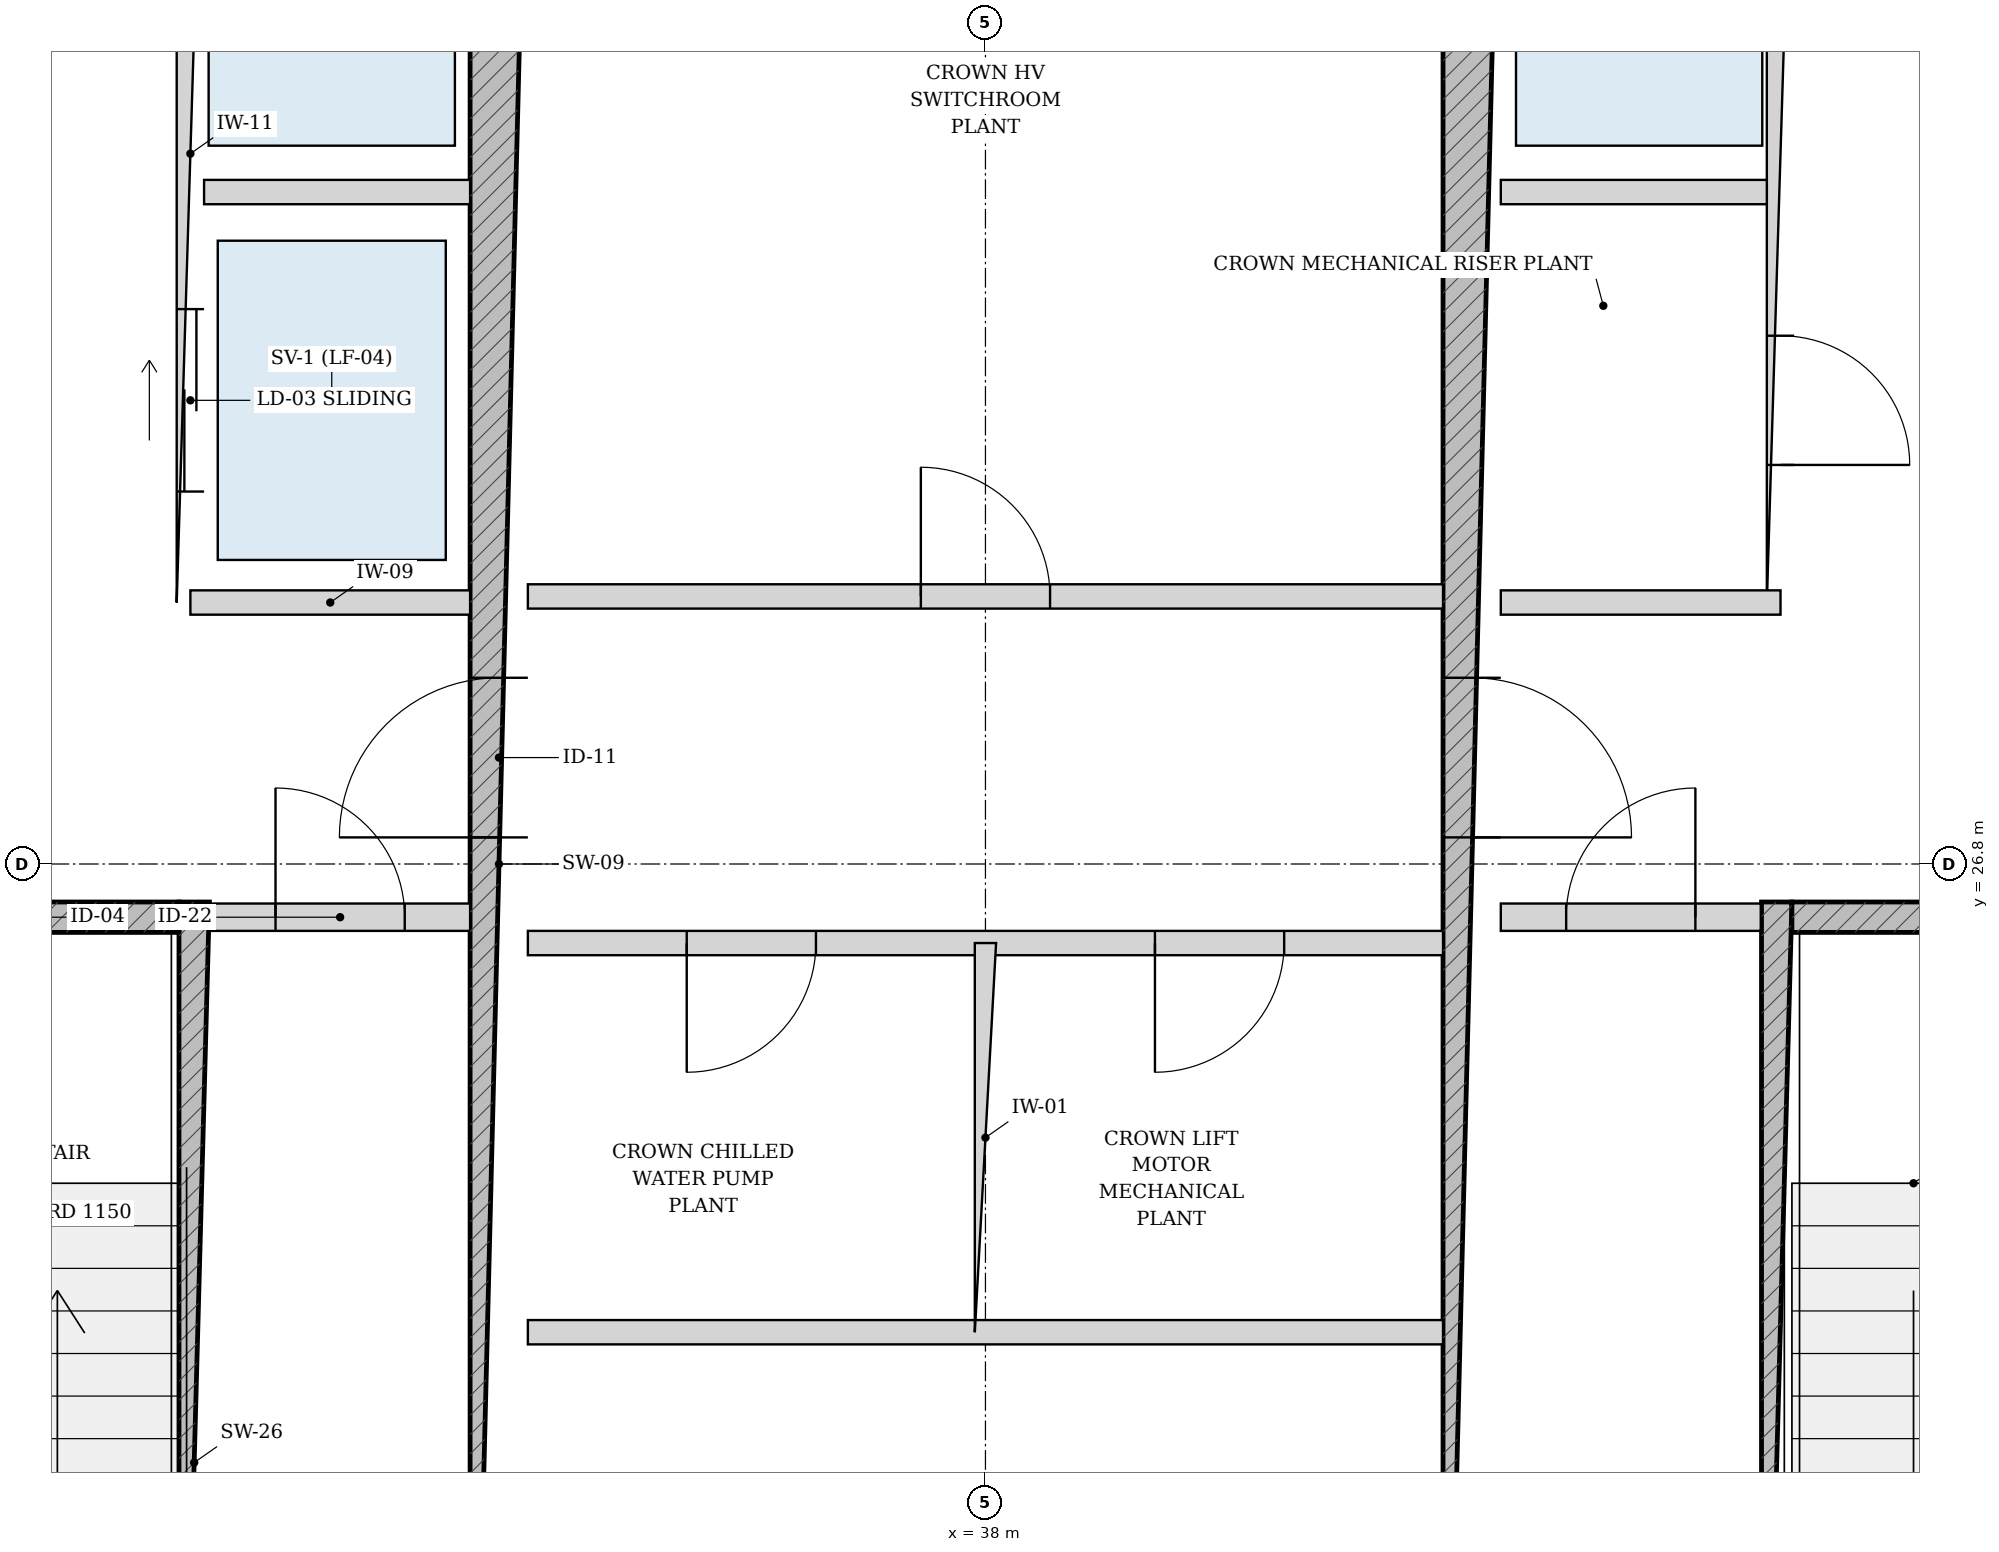
"""IFC4 building model, lengths in metres.
Left out: names, types, materials, properties, quantities, classifications, styles, units other than length and angle.
Written with IfcOpenShell. Run it as: python <this file> out.ifc"""

import sys

from ifc_helpers import new_model, si_unit, direction, frame, frame_2d, origin, place, context, subcontext, project, spatial, rectangle, extrude, source, transform, mapped, element, fill, save


model = new_model("IFC4")
c1 = context("Model", 3, precision=1e-05, world=origin(), true_north=direction((-0.2419218956, 0.970295726276)))
c2 = subcontext(c1, "Body", "Model", "MODEL_VIEW")
j1 = project(units=[si_unit("LENGTHUNIT", "METRE"), si_unit("PLANEANGLEUNIT", "RADIAN")], contexts=[c1])
p1 = place(None, origin())
s1 = spatial("IfcSite", under=j1, at=p1, CompositionType="ELEMENT")
p2 = place(p1, origin())
s2 = spatial("IfcBuilding", under=s1, at=p2, CompositionType="ELEMENT")
p3 = place(p2, frame((0.0, 0.0, 306.1)))
s3 = spatial("IfcBuildingStorey", under=s2, at=p3, CompositionType="ELEMENT", Elevation=306.1)
p4 = place(p3, frame((32.795, 19.175, 0.0), z_axis=(0.0, 0.0, 1.0), x_axis=(0.0, 1.0, 0.0)))
e1 = element("IfcWall", 1, at=p4, inside=s3, PredefinedType="SOLIDWALL", context=c2, shape_type="SweptSolid", body=[
    extrude(rectangle(XDim=7.375, YDim=0.2, at=frame_2d((3.688, 0.0))), origin(), (0.0, 0.0, 1.0), 4.78),
])
p5 = place(p3, frame((29.375, 26.45, 0.0), z_axis=(0.0, 0.0, 1.0), x_axis=(1.0, 0.0, 0.0)))
e2 = element("IfcWall", 2, at=p5, inside=s3, PredefinedType="SOLIDWALL", context=c2, shape_type="SweptSolid", body=[
    extrude(rectangle(XDim=3.32, YDim=0.2, at=frame_2d((1.66, 0.0))), origin(), (0.0, 0.0, 1.0), 4.78),
])
p6 = place(p5, frame((1.185, 0.0, 0.0)))
e3 = element("IfcOpeningElement", 3, at=p6, cuts=e2, PredefinedType="OPENING", context=c2, shape_type="SweptSolid", body=[
    extrude(rectangle(XDim=0.95, YDim=2.15, at=frame_2d((0.475, 1.075))), frame((0.0, 0.11, 0.0), z_axis=(0.0, -1.0, 0.0), x_axis=(1.0, 0.0, 0.0)), (0.0, 0.0, 1.0), 0.22),
])
p7 = place(p3, frame((43.205, 19.175, 0.0), z_axis=(0.0, 0.0, 1.0), x_axis=(0.0, 1.0, 0.0)))
e4 = element("IfcWall", 4, at=p7, inside=s3, PredefinedType="SOLIDWALL", context=c2, shape_type="SweptSolid", body=[
    extrude(rectangle(XDim=7.375, YDim=0.2, at=frame_2d((3.688, 0.0))), origin(), (0.0, 0.0, 1.0), 4.78),
])
p8 = place(p3, frame((43.305, 26.45, 0.0), z_axis=(0.0, 0.0, 1.0), x_axis=(1.0, 0.0, 0.0)))
e5 = element("IfcWall", 5, at=p8, inside=s3, PredefinedType="SOLIDWALL", context=c2, shape_type="SweptSolid", body=[
    extrude(rectangle(XDim=3.32, YDim=0.2, at=frame_2d((1.66, 0.0))), origin(), (0.0, 0.0, 1.0), 4.78),
])
p9 = place(p8, frame((1.185, 0.0, 0.0)))
e6 = element("IfcOpeningElement", 6, at=p9, cuts=e5, PredefinedType="OPENING", context=c2, shape_type="SweptSolid", body=[
    extrude(rectangle(XDim=0.95, YDim=2.15, at=frame_2d((0.475, 1.075))), frame((0.0, 0.11, 0.0), z_axis=(0.0, -1.0, 0.0), x_axis=(1.0, 0.0, 0.0)), (0.0, 0.0, 1.0), 0.22),
])
p10 = place(p3, frame((34.8, 19.175, 0.0), z_axis=(0.0, 0.0, 1.0), x_axis=(0.0, 1.0, 0.0)))
e7 = element("IfcWall", 7, at=p10, inside=s3, PredefinedType="SHEAR", context=c2, shape_type="SweptSolid", body=[
    extrude(rectangle(XDim=15.25, YDim=0.38, at=frame_2d((7.625, 0.0))), origin(), (0.0, 0.0, 1.0), 4.78),
])
p11 = place(p10, frame((7.8, 0.0, 0.0)))
e8 = element("IfcOpeningElement", 8, at=p11, cuts=e7, PredefinedType="OPENING", context=c2, shape_type="SweptSolid", body=[
    extrude(rectangle(XDim=1.05, YDim=2.15, at=frame_2d((0.525, 1.075))), frame((0.0, 0.2, 0.0), z_axis=(0.0, -1.0, 0.0), x_axis=(1.0, 0.0, 0.0)), (0.0, 0.0, 1.0), 0.4),
])
p12 = place(p3, frame((41.2, 19.175, 0.0), z_axis=(0.0, 0.0, 1.0), x_axis=(0.0, 1.0, 0.0)))
e9 = element("IfcWall", 9, at=p12, inside=s3, PredefinedType="SHEAR", context=c2, shape_type="SweptSolid", body=[
    extrude(rectangle(XDim=15.25, YDim=0.38, at=frame_2d((7.625, 0.0))), origin(), (0.0, 0.0, 1.0), 4.78),
])
p13 = place(p12, frame((7.8, 0.0, 0.0)))
e10 = element("IfcOpeningElement", 10, at=p13, cuts=e9, PredefinedType="OPENING", context=c2, shape_type="SweptSolid", body=[
    extrude(rectangle(XDim=1.05, YDim=2.15, at=frame_2d((0.525, 1.075))), frame((0.0, 0.2, 0.0), z_axis=(0.0, -1.0, 0.0), x_axis=(1.0, 0.0, 0.0)), (0.0, 0.0, 1.0), 0.4),
])
p14 = place(p3, frame((32.9, 26.45, 0.0), z_axis=(0.0, 0.0, 1.0), x_axis=(1.0, 0.0, 0.0)))
e11 = element("IfcWall", 11, at=p14, inside=s3, PredefinedType="PARTITIONING", context=c2, shape_type="SweptSolid", body=[
    extrude(rectangle(XDim=1.71, YDim=0.18, at=frame_2d((0.855, 0.0))), origin(), (0.0, 0.0, 1.0), 4.78),
])
p15 = place(p14, frame((0.43, 0.0, 0.0)))
e12 = element("IfcOpeningElement", 12, at=p15, cuts=e11, PredefinedType="OPENING", context=c2, shape_type="SweptSolid", body=[
    extrude(rectangle(XDim=0.85, YDim=2.1, at=frame_2d((0.425, 1.05))), frame((0.0, 0.1, 0.0), z_axis=(0.0, -1.0, 0.0), x_axis=(1.0, 0.0, 0.0)), (0.0, 0.0, 1.0), 0.2),
])
p16 = place(p3, frame((41.39, 26.45, 0.0), z_axis=(0.0, 0.0, 1.0), x_axis=(1.0, 0.0, 0.0)))
e13 = element("IfcWall", 13, at=p16, inside=s3, PredefinedType="PARTITIONING", context=c2, shape_type="SweptSolid", body=[
    extrude(rectangle(XDim=1.71, YDim=0.18, at=frame_2d((0.855, 0.0))), origin(), (0.0, 0.0, 1.0), 4.78),
])
p17 = place(p16, frame((0.43, 0.0, 0.0)))
e14 = element("IfcOpeningElement", 14, at=p17, cuts=e13, PredefinedType="OPENING", context=c2, shape_type="SweptSolid", body=[
    extrude(rectangle(XDim=0.85, YDim=2.1, at=frame_2d((0.425, 1.05))), frame((0.0, 0.1, 0.0), z_axis=(0.0, -1.0, 0.0), x_axis=(1.0, 0.0, 0.0)), (0.0, 0.0, 1.0), 0.2),
])
p18 = place(p3, frame((32.77, 28.52, 0.0), z_axis=(0.0, 0.0, 1.0), x_axis=(0.0, 1.0, 0.0)))
e15 = element("IfcWall", 15, at=p18, inside=s3, PredefinedType="PARTITIONING", context=c2, shape_type="SweptSolid", body=[
    extrude(rectangle(XDim=5.905, YDim=0.18, at=frame_2d((2.953, 0.0))), origin(), (0.0, 0.0, 1.0), 4.78),
])
p19 = place(p18, frame((3.655, 0.0, 0.0)))
e16 = element("IfcOpeningElement", 16, at=p19, cuts=e15, PredefinedType="OPENING", context=c2, shape_type="SweptSolid", body=[
    extrude(rectangle(XDim=1.15, YDim=2.2, at=frame_2d((0.575, 1.1))), frame((0.0, 0.1, 0.0), z_axis=(0.0, -1.0, 0.0), x_axis=(1.0, 0.0, 0.0)), (0.0, 0.0, 1.0), 0.2),
])
p20 = place(p18, frame((0.73, 0.0, 0.0)))
e17 = element("IfcOpeningElement", 17, at=p20, cuts=e15, PredefinedType="OPENING", context=c2, shape_type="SweptSolid", body=[
    extrude(rectangle(XDim=1.2, YDim=2.25, at=frame_2d((0.6, 1.125))), frame((0.0, 0.1, 0.0), z_axis=(0.0, -1.0, 0.0), x_axis=(1.0, 0.0, 0.0)), (0.0, 0.0, 1.0), 0.2),
])
p21 = place(p3, frame((32.86, 31.22, 0.0), z_axis=(0.0, 0.0, 1.0), x_axis=(1.0, 0.0, 0.0)))
e18 = element("IfcWall", 18, at=p21, inside=s3, PredefinedType="PARTITIONING", context=c2, shape_type="SweptSolid", body=[
    extrude(rectangle(XDim=1.75, YDim=0.16, at=frame_2d((0.875, 0.0))), origin(), (0.0, 0.0, 1.0), 4.78),
])
p22 = place(p3, frame((32.77, 28.52, 0.0), z_axis=(0.0, 0.0, 1.0), x_axis=(1.0, 0.0, 0.0)))
e19 = element("IfcWall", 19, at=p22, inside=s3, PredefinedType="PARTITIONING", context=c2, shape_type="SweptSolid", body=[
    extrude(rectangle(XDim=1.84, YDim=0.16, at=frame_2d((0.92, 0.0))), origin(), (0.0, 0.0, 1.0), 4.78),
])
p23 = place(p3, frame((43.23, 28.52, 0.0), z_axis=(0.0, 0.0, 1.0), x_axis=(0.0, 1.0, 0.0)))
e20 = element("IfcWall", 20, at=p23, inside=s3, PredefinedType="PARTITIONING", context=c2, shape_type="SweptSolid", body=[
    extrude(rectangle(XDim=5.905, YDim=0.18, at=frame_2d((2.953, 0.0))), origin(), (0.0, 0.0, 1.0), 4.78),
])
p24 = place(p23, frame((0.905, 0.0, 0.0)))
e21 = element("IfcOpeningElement", 21, at=p24, cuts=e20, PredefinedType="OPENING", context=c2, shape_type="SweptSolid", body=[
    extrude(rectangle(XDim=0.85, YDim=2.1, at=frame_2d((0.425, 1.05))), frame((0.0, 0.1, 0.0), z_axis=(0.0, -1.0, 0.0), x_axis=(1.0, 0.0, 0.0)), (0.0, 0.0, 1.0), 0.2),
])
p25 = place(p23, frame((3.655, 0.0, 0.0)))
e22 = element("IfcOpeningElement", 22, at=p25, cuts=e20, PredefinedType="OPENING", context=c2, shape_type="SweptSolid", body=[
    extrude(rectangle(XDim=1.15, YDim=2.2, at=frame_2d((0.575, 1.1))), frame((0.0, 0.1, 0.0), z_axis=(0.0, -1.0, 0.0), x_axis=(1.0, 0.0, 0.0)), (0.0, 0.0, 1.0), 0.2),
])
p26 = place(p3, frame((41.39, 31.22, 0.0), z_axis=(0.0, 0.0, 1.0), x_axis=(1.0, 0.0, 0.0)))
e23 = element("IfcWall", 23, at=p26, inside=s3, PredefinedType="PARTITIONING", context=c2, shape_type="SweptSolid", body=[
    extrude(rectangle(XDim=1.75, YDim=0.16, at=frame_2d((0.875, 0.0))), origin(), (0.0, 0.0, 1.0), 4.78),
])
p27 = place(p3, frame((41.39, 28.52, 0.0), z_axis=(0.0, 0.0, 1.0), x_axis=(1.0, 0.0, 0.0)))
e24 = element("IfcWall", 24, at=p27, inside=s3, PredefinedType="PARTITIONING", context=c2, shape_type="SweptSolid", body=[
    extrude(rectangle(XDim=1.84, YDim=0.16, at=frame_2d((0.92, 0.0))), origin(), (0.0, 0.0, 1.0), 4.78),
])
p28 = place(p3, frame((34.99, 28.56, 0.0), z_axis=(0.0, 0.0, 1.0), x_axis=(1.0, 0.0, 0.0)))
e25 = element("IfcWall", 25, at=p28, inside=s3, PredefinedType="PARTITIONING", context=c2, shape_type="SweptSolid", body=[
    extrude(rectangle(XDim=6.02, YDim=0.16, at=frame_2d((3.01, 0.0))), origin(), (0.0, 0.0, 1.0), 4.78),
])
p29 = place(p28, frame((2.585, 0.0, 0.0)))
e26 = element("IfcOpeningElement", 26, at=p29, cuts=e25, PredefinedType="OPENING", context=c2, shape_type="SweptSolid", body=[
    extrude(rectangle(XDim=0.85, YDim=2.1, at=frame_2d((0.425, 1.05))), frame((0.0, 0.09, 0.0), z_axis=(0.0, -1.0, 0.0), x_axis=(1.0, 0.0, 0.0)), (0.0, 0.0, 1.0), 0.18),
])
p30 = place(p3, frame((34.99, 26.28, 0.0), z_axis=(0.0, 0.0, 1.0), x_axis=(1.0, 0.0, 0.0)))
e27 = element("IfcWall", 27, at=p30, inside=s3, PredefinedType="PARTITIONING", context=c2, shape_type="SweptSolid", body=[
    extrude(rectangle(XDim=6.02, YDim=0.16, at=frame_2d((3.01, 0.0))), origin(), (0.0, 0.0, 1.0), 4.78),
])
p31 = place(p30, frame((1.045, 0.0, 0.0)))
e28 = element("IfcOpeningElement", 28, at=p31, cuts=e27, PredefinedType="OPENING", context=c2, shape_type="SweptSolid", body=[
    extrude(rectangle(XDim=0.85, YDim=2.1, at=frame_2d((0.425, 1.05))), frame((0.0, 0.09, 0.0), z_axis=(0.0, -1.0, 0.0), x_axis=(1.0, 0.0, 0.0)), (0.0, 0.0, 1.0), 0.18),
])
p32 = place(p30, frame((4.125, 0.0, 0.0)))
e29 = element("IfcOpeningElement", 29, at=p32, cuts=e27, PredefinedType="OPENING", context=c2, shape_type="SweptSolid", body=[
    extrude(rectangle(XDim=0.85, YDim=2.1, at=frame_2d((0.425, 1.05))), frame((0.0, 0.09, 0.0), z_axis=(0.0, -1.0, 0.0), x_axis=(1.0, 0.0, 0.0)), (0.0, 0.0, 1.0), 0.18),
])
p33 = place(p3, frame((34.99, 23.72, 0.0), z_axis=(0.0, 0.0, 1.0), x_axis=(1.0, 0.0, 0.0)))
e30 = element("IfcWall", 30, at=p33, inside=s3, PredefinedType="PARTITIONING", context=c2, shape_type="SweptSolid", body=[
    extrude(rectangle(XDim=6.02, YDim=0.16, at=frame_2d((3.01, 0.0))), origin(), (0.0, 0.0, 1.0), 4.78),
])
p34 = place(p3, frame((38.0, 23.72, 0.0), z_axis=(0.0, 0.0, 1.0), x_axis=(0.0, 1.0, 0.0)))
e31 = element("IfcWall", 31, at=p34, inside=s3, PredefinedType="PARTITIONING", context=c2, shape_type="SweptSolid", body=[
    extrude(rectangle(XDim=2.56, YDim=0.14, at=frame_2d((1.28, 0.0))), origin(), (0.0, 0.0, 1.0), 4.78),
])
m1 = source(origin(), c2, "Body", "SweptSolid", [
    extrude(rectangle(XDim=1.05, YDim=2.15, at=frame_2d((0.525, 1.075))), frame((0.0, 0.025, 0.0), z_axis=(0.0, -1.0, 0.0), x_axis=(1.0, 0.0, 0.0)), (0.0, 0.0, 1.0), 0.05),
])
p35 = place(p11, origin())
e32 = element("IfcDoor", 32, at=p35, inside=s3, OperationType="SINGLE_SWING_LEFT", PredefinedType="DOOR", context=c2, shape_type="MappedRepresentation", body=[
    mapped(m1, transform((0.0, 0.0, 0.0), scale=1.0)),
])
fill(e8, e32)
p36 = place(p13, frame((1.05, 0.0, 0.0), z_axis=(0.0, 0.0, 1.0), x_axis=(-1.0, 0.0, 0.0)))
e33 = element("IfcDoor", 33, at=p36, inside=s3, OperationType="SINGLE_SWING_RIGHT", PredefinedType="DOOR", context=c2, shape_type="MappedRepresentation", body=[
    mapped(m1, transform((0.0, 0.0, 0.0), scale=1.0)),
])
fill(e10, e33)
m2 = source(origin(), c2, "Body", "SweptSolid", [
    extrude(rectangle(XDim=0.85, YDim=2.1, at=frame_2d((0.425, 1.05))), frame((0.0, 0.025, 0.0), z_axis=(0.0, -1.0, 0.0), x_axis=(1.0, 0.0, 0.0)), (0.0, 0.0, 1.0), 0.05),
])
p37 = place(p15, origin())
e34 = element("IfcDoor", 34, at=p37, inside=s3, OperationType="SINGLE_SWING_LEFT", PredefinedType="DOOR", context=c2, shape_type="MappedRepresentation", body=[
    mapped(m2, transform((0.0, 0.0, 0.0), scale=1.0)),
])
fill(e12, e34)
p38 = place(p17, origin())
e35 = element("IfcDoor", 35, at=p38, inside=s3, OperationType="SINGLE_SWING_RIGHT", PredefinedType="DOOR", context=c2, shape_type="MappedRepresentation", body=[
    mapped(m2, transform((0.0, 0.0, 0.0), scale=1.0)),
])
fill(e14, e35)
p39 = place(p24, frame((0.85, 0.0, 0.0), z_axis=(0.0, 0.0, 1.0), x_axis=(-1.0, 0.0, 0.0)))
e36 = element("IfcDoor", 36, at=p39, inside=s3, OperationType="SINGLE_SWING_RIGHT", PredefinedType="DOOR", context=c2, shape_type="MappedRepresentation", body=[
    mapped(m2, transform((0.0, 0.0, 0.0), scale=1.0)),
])
fill(e21, e36)
p40 = place(p29, origin())
e37 = element("IfcDoor", 37, at=p40, inside=s3, OperationType="SINGLE_SWING_LEFT", PredefinedType="DOOR", context=c2, shape_type="MappedRepresentation", body=[
    mapped(m2, transform((0.0, 0.0, 0.0), scale=1.0)),
])
fill(e26, e37)
p41 = place(p31, frame((0.85, 0.0, 0.0), z_axis=(0.0, 0.0, 1.0), x_axis=(-1.0, 0.0, 0.0)))
e38 = element("IfcDoor", 38, at=p41, inside=s3, OperationType="SINGLE_SWING_RIGHT", PredefinedType="DOOR", context=c2, shape_type="MappedRepresentation", body=[
    mapped(m2, transform((0.0, 0.0, 0.0), scale=1.0)),
])
fill(e28, e38)
p42 = place(p32, frame((0.85, 0.0, 0.0), z_axis=(0.0, 0.0, 1.0), x_axis=(-1.0, 0.0, 0.0)))
e39 = element("IfcDoor", 39, at=p42, inside=s3, OperationType="SINGLE_SWING_RIGHT", PredefinedType="DOOR", context=c2, shape_type="MappedRepresentation", body=[
    mapped(m2, transform((0.0, 0.0, 0.0), scale=1.0)),
])
fill(e29, e39)
m3 = source(origin(), c2, "Body", "SweptSolid", [
    extrude(rectangle(XDim=1.2, YDim=2.25, at=frame_2d((0.6, 1.125))), frame((0.0, 0.025, 0.0), z_axis=(0.0, -1.0, 0.0), x_axis=(1.0, 0.0, 0.0)), (0.0, 0.0, 1.0), 0.05),
])
p43 = place(p20, origin())
e40 = element("IfcDoor", 40, at=p43, inside=s3, OperationType="DOUBLE_DOOR_SLIDING", PredefinedType="DOOR", context=c2, shape_type="MappedRepresentation", body=[
    mapped(m3, transform((0.0, 0.0, 0.0), scale=1.0)),
])
fill(e17, e40)
save(model, sys.argv[1])
